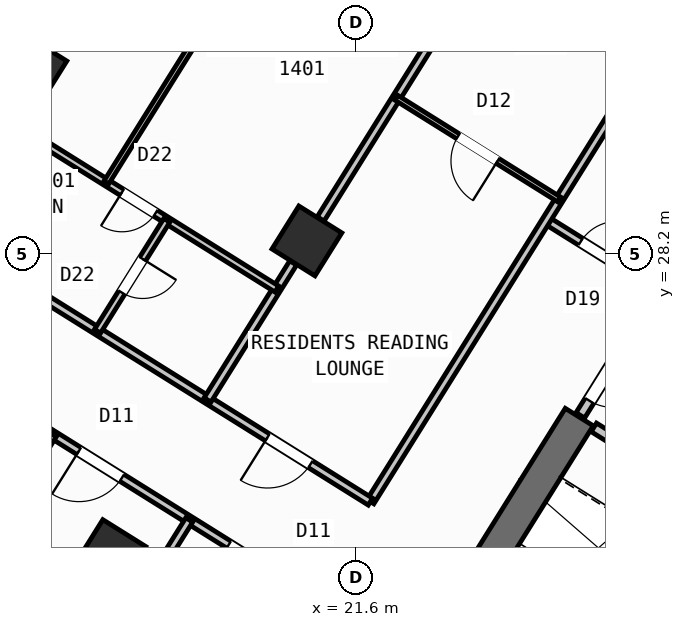
"""IFC4 building model, lengths in metres.
Left out: names, types, materials, properties, quantities, classifications, styles, units other than length and angle.
Written with IfcOpenShell. Run it as: python <this file> out.ifc"""

import sys

from ifc_helpers import new_model, si_unit, direction, frame, frame_2d, origin, origin_2d, place, context, subcontext, project, spatial, rectangle, hollow_rectangle, extrude, source, transform, mapped, element, fill, save


model = new_model("IFC4")
c1 = context("Model", 3, precision=1e-05, world=origin(), true_north=direction((0.0, 1.0)))
c2 = subcontext(c1, "Body", "Model", "MODEL_VIEW")
j1 = project(units=[si_unit("LENGTHUNIT", "METRE"), si_unit("PLANEANGLEUNIT", "RADIAN")], contexts=[c1])
p1 = place(None, origin())
s1 = spatial("IfcSite", under=j1, at=p1, CompositionType="ELEMENT")
p2 = place(p1, origin())
s2 = spatial("IfcBuilding", under=s1, at=p2, CompositionType="ELEMENT")
p3 = place(p2, frame((0.0, 0.0, 56.4)))
s3 = spatial("IfcBuildingStorey", under=s2, at=p3, CompositionType="ELEMENT", Elevation=56.4)
p4 = place(p3, frame((26.007, 24.976, 0.0), z_axis=(0.0, 0.0, 1.0), x_axis=(-0.529916319127, -0.848049936456, 0.0)))
e1 = element("IfcWall", 1, at=p4, inside=s3, PredefinedType="SHEAR", context=c2, shape_type="SweptSolid", body=[
    extrude(rectangle(XDim=6.375, YDim=0.65, at=frame_2d((3.188, 0.0))), origin(), (0.0, 0.0, 1.0), 3.35),
])
m1 = source(origin(), c2, "Body", "SweptSolid", [
    extrude(hollow_rectangle(XDim=1.0, YDim=1.0, WallThickness=0.04, at=origin_2d()), origin(), (0.0, 0.0, 1.0), 3.6),
])
for number, where, z_axis, x_axis in (
    (2, (20.632, 28.452, 0.0), (0.0, 0.0, 1.0), (-0.848, 0.53, 0.0)),
    (3, (16.764, 22.261, 0.0), (0.0, 0.0, 1.0), (-0.848, 0.53, 0.0)),
    (4, (15.205, 31.844, 0.0), (0.0, 0.0, 1.0), (-0.848, 0.53, 0.0)),
):
    element("IfcColumn", number, at=place(p3, frame(where, z_axis=z_axis, x_axis=x_axis)), inside=s3, PredefinedType="COLUMN", context=c2, shape_type="MappedRepresentation", body=[
        mapped(m1, transform((0.0, 0.0, 0.0), scale=1.0)),
    ])
p5 = place(p3, frame((29.268, 6.429, 0.0), z_axis=(0.0, 0.0, 1.0), x_axis=(-0.848049971435, 0.529916263149, 0.0)))
e5 = element("IfcWall", 5, at=p5, inside=s3, PredefinedType="STANDARD", context=c2, shape_type="SweptSolid", body=[
    extrude(rectangle(XDim=31.588, YDim=0.32, at=frame_2d((15.794, 0.0))), origin(), (0.0, 0.0, 1.0), 3.35),
])
p6 = place(p5, frame((16.235, 0.0, 0.0)))
e6 = element("IfcOpeningElement", 6, at=p6, cuts=e5, PredefinedType="OPENING", context=c2, shape_type="SweptSolid", body=[
    extrude(rectangle(XDim=1.2, YDim=2.15, at=frame_2d((0.6, 1.075))), frame((0.0, 0.17, 0.0), z_axis=(0.0, -1.0, 0.0), x_axis=(1.0, 0.0, 0.0)), (0.0, 0.0, 1.0), 0.34),
])
p7 = place(p5, frame((2.989, 0.0, 0.8)))
e7 = element("IfcOpeningElement", 7, at=p7, cuts=e5, PredefinedType="OPENING", context=c2, shape_type="SweptSolid", body=[
    extrude(rectangle(XDim=2.1, YDim=1.55, at=frame_2d((1.05, 0.775))), frame((0.0, 0.17, 0.0), z_axis=(0.0, -1.0, 0.0), x_axis=(1.0, 0.0, 0.0)), (0.0, 0.0, 1.0), 0.34),
])
p8 = place(p5, frame((8.359, 0.0, 0.8)))
e8 = element("IfcOpeningElement", 8, at=p8, cuts=e5, PredefinedType="OPENING", context=c2, shape_type="SweptSolid", body=[
    extrude(rectangle(XDim=2.1, YDim=1.55, at=frame_2d((1.05, 0.775))), frame((0.0, 0.17, 0.0), z_axis=(0.0, -1.0, 0.0), x_axis=(1.0, 0.0, 0.0)), (0.0, 0.0, 1.0), 0.34),
])
p9 = place(p5, frame((13.284, 0.0, 0.95)))
e9 = element("IfcOpeningElement", 9, at=p9, cuts=e5, PredefinedType="OPENING", context=c2, shape_type="SweptSolid", body=[
    extrude(rectangle(XDim=1.2, YDim=1.4, at=frame_2d((0.6, 0.7))), frame((0.0, 0.17, 0.0), z_axis=(0.0, -1.0, 0.0), x_axis=(1.0, 0.0, 0.0)), (0.0, 0.0, 1.0), 0.34),
])
p10 = place(p5, frame((22.374, 0.0, 0.95)))
e10 = element("IfcOpeningElement", 10, at=p10, cuts=e5, PredefinedType="OPENING", context=c2, shape_type="SweptSolid", body=[
    extrude(rectangle(XDim=1.2, YDim=1.4, at=frame_2d((0.6, 0.7))), frame((0.0, 0.17, 0.0), z_axis=(0.0, -1.0, 0.0), x_axis=(1.0, 0.0, 0.0)), (0.0, 0.0, 1.0), 0.34),
])
p11 = place(p5, frame((26.351, 0.0, 1.0)))
e11 = element("IfcOpeningElement", 11, at=p11, cuts=e5, PredefinedType="OPENING", context=c2, shape_type="SweptSolid", body=[
    extrude(rectangle(XDim=0.9, YDim=1.25, at=frame_2d((0.45, 0.625))), frame((0.0, 0.17, 0.0), z_axis=(0.0, -1.0, 0.0), x_axis=(1.0, 0.0, 0.0)), (0.0, 0.0, 1.0), 0.34),
])
p12 = place(p5, frame((29.052, 0.0, 0.85)))
e12 = element("IfcOpeningElement", 12, at=p12, cuts=e5, PredefinedType="OPENING", context=c2, shape_type="SweptSolid", body=[
    extrude(rectangle(XDim=1.8, YDim=1.5, at=frame_2d((0.9, 0.75))), frame((0.0, 0.17, 0.0), z_axis=(0.0, -1.0, 0.0), x_axis=(1.0, 0.0, 0.0)), (0.0, 0.0, 1.0), 0.34),
])
p13 = place(p3, frame((14.138, 41.825, 0.0), z_axis=(0.0, 0.0, 1.0), x_axis=(0.848046498049, -0.529921821731, 0.0)))
e13 = element("IfcWall", 13, at=p13, inside=s3, PredefinedType="STANDARD", context=c2, shape_type="SweptSolid", body=[
    extrude(rectangle(XDim=31.588, YDim=0.32, at=frame_2d((15.794, 0.0))), origin(), (0.0, 0.0, 1.0), 3.35),
])
p14 = place(p13, frame((9.772, 0.0, 0.0)))
e14 = element("IfcOpeningElement", 14, at=p14, cuts=e13, PredefinedType="OPENING", context=c2, shape_type="SweptSolid", body=[
    extrude(rectangle(XDim=1.05, YDim=2.15, at=frame_2d((0.525, 1.075))), frame((0.0, 0.17, 0.0), z_axis=(0.0, -1.0, 0.0), x_axis=(1.0, 0.0, 0.0)), (0.0, 0.0, 1.0), 0.34),
])
p15 = place(p13, frame((0.966, 0.0, 0.85)))
e15 = element("IfcOpeningElement", 15, at=p15, cuts=e13, PredefinedType="OPENING", context=c2, shape_type="SweptSolid", body=[
    extrude(rectangle(XDim=1.5, YDim=1.5, at=frame_2d((0.75, 0.75))), frame((0.0, 0.17, 0.0), z_axis=(0.0, -1.0, 0.0), x_axis=(1.0, 0.0, 0.0)), (0.0, 0.0, 1.0), 0.34),
])
p16 = place(p13, frame((4.121, 0.0, 1.0)))
e16 = element("IfcOpeningElement", 16, at=p16, cuts=e13, PredefinedType="OPENING", context=c2, shape_type="SweptSolid", body=[
    extrude(rectangle(XDim=0.9, YDim=1.25, at=frame_2d((0.45, 0.625))), frame((0.0, 0.17, 0.0), z_axis=(0.0, -1.0, 0.0), x_axis=(1.0, 0.0, 0.0)), (0.0, 0.0, 1.0), 0.34),
])
p17 = place(p13, frame((13.899, 0.0, 0.85)))
e17 = element("IfcOpeningElement", 17, at=p17, cuts=e13, PredefinedType="OPENING", context=c2, shape_type="SweptSolid", body=[
    extrude(rectangle(XDim=1.5, YDim=1.5, at=frame_2d((0.75, 0.75))), frame((0.0, 0.17, 0.0), z_axis=(0.0, -1.0, 0.0), x_axis=(1.0, 0.0, 0.0)), (0.0, 0.0, 1.0), 0.34),
])
p18 = place(p13, frame((22.019, 0.0, 0.95)))
e18 = element("IfcOpeningElement", 18, at=p18, cuts=e13, PredefinedType="OPENING", context=c2, shape_type="SweptSolid", body=[
    extrude(rectangle(XDim=1.2, YDim=1.4, at=frame_2d((0.6, 0.7))), frame((0.0, 0.17, 0.0), z_axis=(0.0, -1.0, 0.0), x_axis=(1.0, 0.0, 0.0)), (0.0, 0.0, 1.0), 0.34),
])
p19 = place(p13, frame((27.569, 0.0, 0.95)))
e19 = element("IfcOpeningElement", 19, at=p19, cuts=e13, PredefinedType="OPENING", context=c2, shape_type="SweptSolid", body=[
    extrude(rectangle(XDim=1.2, YDim=1.4, at=frame_2d((0.6, 0.7))), frame((0.0, 0.17, 0.0), z_axis=(0.0, -1.0, 0.0), x_axis=(1.0, 0.0, 0.0)), (0.0, 0.0, 1.0), 0.34),
])
p20 = place(p3, frame((31.525, 21.504, 0.0), z_axis=(0.0, 0.0, 1.0), x_axis=(-0.848044998614, 0.529924221305, 0.0)))
e20 = element("IfcWall", 20, at=p20, inside=s3, PredefinedType="STANDARD", context=c2, shape_type="SweptSolid", body=[
    extrude(rectangle(XDim=6.168, YDim=0.2, at=frame_2d((3.084, 0.0))), origin(), (0.0, 0.0, 1.0), 3.34),
])
p21 = place(p20, frame((4.4, 0.0, 0.0)))
e21 = element("IfcOpeningElement", 21, at=p21, cuts=e20, PredefinedType="OPENING", context=c2, shape_type="SweptSolid", body=[
    extrude(rectangle(XDim=0.86, YDim=2.05, at=frame_2d((0.43, 1.025))), frame((0.0, 0.11, 0.0), z_axis=(0.0, -1.0, 0.0), x_axis=(1.0, 0.0, 0.0)), (0.0, 0.0, 1.0), 0.22),
])
p22 = place(p20, frame((1.45, 0.0, 0.0)))
e22 = element("IfcOpeningElement", 22, at=p22, cuts=e20, PredefinedType="OPENING", context=c2, shape_type="SweptSolid", body=[
    extrude(rectangle(XDim=0.86, YDim=2.05, at=frame_2d((0.43, 1.025))), frame((0.0, 0.11, 0.0), z_axis=(0.0, -1.0, 0.0), x_axis=(1.0, 0.0, 0.0)), (0.0, 0.0, 1.0), 0.22),
])
p23 = place(p3, frame((27.596, 27.52, 0.0), z_axis=(0.0, 0.0, 1.0), x_axis=(-0.529865479138, -0.848081702443, 0.0)))
e23 = element("IfcWall", 23, at=p23, inside=s3, PredefinedType="STANDARD", context=c2, shape_type="SweptSolid", body=[
    extrude(rectangle(XDim=2.96, YDim=0.2, at=frame_2d((1.48, 0.0))), origin(), (0.0, 0.0, 1.0), 3.34),
])
p24 = place(p23, frame((1.76, 0.0, 0.0)))
e24 = element("IfcOpeningElement", 24, at=p24, cuts=e23, PredefinedType="OPENING", context=c2, shape_type="SweptSolid", body=[
    extrude(rectangle(XDim=0.86, YDim=2.05, at=frame_2d((0.43, 1.025))), frame((0.0, 0.11, 0.0), z_axis=(0.0, -1.0, 0.0), x_axis=(1.0, 0.0, 0.0)), (0.0, 0.0, 1.0), 0.22),
])
p25 = place(p3, frame((27.57, 27.478, 0.0), z_axis=(0.0, 0.0, 1.0), x_axis=(-0.848050851465, 0.529914854792, 0.0)))
e25 = element("IfcWall", 25, at=p25, inside=s3, PredefinedType="PARTITIONING", context=c2, shape_type="SweptSolid", body=[
    extrude(rectangle(XDim=2.61, YDim=0.16, at=frame_2d((1.305, 0.0))), origin(), (0.0, 0.0, 1.0), 3.34),
])
p26 = place(p25, frame((0.95, 0.0, 0.0)))
e26 = element("IfcOpeningElement", 26, at=p26, cuts=e25, PredefinedType="OPENING", context=c2, shape_type="SweptSolid", body=[
    extrude(rectangle(XDim=0.86, YDim=2.05, at=frame_2d((0.43, 1.025))), frame((0.0, 0.09, 0.0), z_axis=(0.0, -1.0, 0.0), x_axis=(1.0, 0.0, 0.0)), (0.0, 0.0, 1.0), 0.18),
])
p27 = place(p3, frame((27.953, 33.016, 0.0), z_axis=(0.0, 0.0, 1.0), x_axis=(-0.529905022231, -0.848056995381, 0.0)))
e27 = element("IfcWall", 27, at=p27, inside=s3, PredefinedType="PARTITIONING", context=c2, shape_type="SweptSolid", body=[
    extrude(rectangle(XDim=11.45, YDim=0.16, at=frame_2d((5.725, 0.0))), origin(), (0.0, 0.0, 1.0), 3.34),
])
p28 = place(p3, frame((21.885, 23.306, 0.0), z_axis=(0.0, 0.0, 1.0), x_axis=(-0.848052408131, 0.529912363569, 0.0)))
e28 = element("IfcWall", 28, at=p28, inside=s3, PredefinedType="PARTITIONING", context=c2, shape_type="SweptSolid", body=[
    extrude(rectangle(XDim=16.73, YDim=0.16, at=frame_2d((8.365, 0.0))), origin(), (0.0, 0.0, 1.0), 3.34),
])
p29 = place(p28, frame((1.395, 0.0, 0.0)))
e29 = element("IfcOpeningElement", 29, at=p29, cuts=e28, PredefinedType="OPENING", context=c2, shape_type="SweptSolid", body=[
    extrude(rectangle(XDim=1.0, YDim=2.1, at=frame_2d((0.5, 1.05))), frame((0.0, 0.09, 0.0), z_axis=(0.0, -1.0, 0.0), x_axis=(1.0, 0.0, 0.0)), (0.0, 0.0, 1.0), 0.18),
])
p30 = place(p28, frame((7.82, 0.0, 0.0)))
e30 = element("IfcOpeningElement", 30, at=p30, cuts=e28, PredefinedType="OPENING", context=c2, shape_type="SweptSolid", body=[
    extrude(rectangle(XDim=1.0, YDim=2.1, at=frame_2d((0.5, 1.05))), frame((0.0, 0.09, 0.0), z_axis=(0.0, -1.0, 0.0), x_axis=(1.0, 0.0, 0.0)), (0.0, 0.0, 1.0), 0.18),
])
p31 = place(p28, frame((11.14, 0.0, 0.0)))
e31 = element("IfcOpeningElement", 31, at=p31, cuts=e28, PredefinedType="OPENING", context=c2, shape_type="SweptSolid", body=[
    extrude(rectangle(XDim=1.0, YDim=2.1, at=frame_2d((0.5, 1.05))), frame((0.0, 0.09, 0.0), z_axis=(0.0, -1.0, 0.0), x_axis=(1.0, 0.0, 0.0)), (0.0, 0.0, 1.0), 0.18),
])
p32 = place(p3, frame((20.719, 21.44, 0.0), z_axis=(0.0, 0.0, 1.0), x_axis=(-0.848048310262, 0.529918921593, 0.0)))
e32 = element("IfcWall", 32, at=p32, inside=s3, PredefinedType="PARTITIONING", context=c2, shape_type="SweptSolid", body=[
    extrude(rectangle(XDim=16.73, YDim=0.16, at=frame_2d((8.365, 0.0))), origin(), (0.0, 0.0, 1.0), 3.34),
])
p33 = place(p32, frame((0.92, 0.0, 0.0)))
e33 = element("IfcOpeningElement", 33, at=p33, cuts=e32, PredefinedType="OPENING", context=c2, shape_type="SweptSolid", body=[
    extrude(rectangle(XDim=1.0, YDim=2.1, at=frame_2d((0.5, 1.05))), frame((0.0, 0.09, 0.0), z_axis=(0.0, -1.0, 0.0), x_axis=(1.0, 0.0, 0.0)), (0.0, 0.0, 1.0), 0.18),
])
p34 = place(p32, frame((4.408, 0.0, 0.0)))
e34 = element("IfcOpeningElement", 34, at=p34, cuts=e32, PredefinedType="OPENING", context=c2, shape_type="SweptSolid", body=[
    extrude(rectangle(XDim=1.0, YDim=2.1, at=frame_2d((0.5, 1.05))), frame((0.0, 0.09, 0.0), z_axis=(0.0, -1.0, 0.0), x_axis=(1.0, 0.0, 0.0)), (0.0, 0.0, 1.0), 0.18),
])
p35 = place(p32, frame((7.271, 0.0, 0.0)))
e35 = element("IfcOpeningElement", 35, at=p35, cuts=e32, PredefinedType="OPENING", context=c2, shape_type="SweptSolid", body=[
    extrude(rectangle(XDim=1.0, YDim=2.1, at=frame_2d((0.5, 1.05))), frame((0.0, 0.09, 0.0), z_axis=(0.0, -1.0, 0.0), x_axis=(1.0, 0.0, 0.0)), (0.0, 0.0, 1.0), 0.18),
])
p36 = place(p32, frame((10.78, 0.0, 0.0)))
e36 = element("IfcOpeningElement", 36, at=p36, cuts=e32, PredefinedType="OPENING", context=c2, shape_type="SweptSolid", body=[
    extrude(rectangle(XDim=1.0, YDim=2.1, at=frame_2d((0.5, 1.05))), frame((0.0, 0.09, 0.0), z_axis=(0.0, -1.0, 0.0), x_axis=(1.0, 0.0, 0.0)), (0.0, 0.0, 1.0), 0.18),
])
p37 = place(p32, frame((14.372, 0.0, 0.0)))
e37 = element("IfcOpeningElement", 37, at=p37, cuts=e32, PredefinedType="OPENING", context=c2, shape_type="SweptSolid", body=[
    extrude(rectangle(XDim=1.0, YDim=2.1, at=frame_2d((0.5, 1.05))), frame((0.0, 0.09, 0.0), z_axis=(0.0, -1.0, 0.0), x_axis=(1.0, 0.0, 0.0)), (0.0, 0.0, 1.0), 0.18),
])
p38 = place(p3, frame((18.31, 22.946, 0.0), z_axis=(0.0, 0.0, 1.0), x_axis=(-0.529914428959, -0.848051117552, 0.0)))
e38 = element("IfcWall", 38, at=p38, inside=s3, PredefinedType="PARTITIONING", context=c2, shape_type="SweptSolid", body=[
    extrude(rectangle(XDim=8.05, YDim=0.16, at=frame_2d((4.025, 0.0))), origin(), (0.0, 0.0, 1.0), 3.34),
])
p39 = place(p3, frame((15.618, 24.628, 0.0), z_axis=(0.0, 0.0, 1.0), x_axis=(-0.529928058306, -0.848042600947, 0.0)))
e39 = element("IfcWall", 39, at=p39, inside=s3, PredefinedType="PARTITIONING", context=c2, shape_type="SweptSolid", body=[
    extrude(rectangle(XDim=8.05, YDim=0.16, at=frame_2d((4.025, 0.0))), origin(), (0.0, 0.0, 1.0), 2.995),
])
p40 = place(p3, frame((24.229, 34.209, 0.0), z_axis=(0.0, 0.0, 1.0), x_axis=(-0.529897533635, -0.848061674554, 0.0)))
e40 = element("IfcWall", 40, at=p40, inside=s3, PredefinedType="PARTITIONING", context=c2, shape_type="SweptSolid", body=[
    extrude(rectangle(XDim=6.276, YDim=0.16, at=frame_2d((3.138, 0.0))), origin(), (0.0, 0.0, 1.0), 2.725),
])
p41 = place(p3, frame((20.361, 28.018, 0.0), z_axis=(0.0, 0.0, 1.0), x_axis=(-0.529875025416, -0.848075738033, 0.0)))
e41 = element("IfcWall", 41, at=p41, inside=s3, PredefinedType="PARTITIONING", context=c2, shape_type="SweptSolid", body=[
    extrude(rectangle(XDim=3.188, YDim=0.16, at=frame_2d((1.594, 0.0))), origin(), (0.0, 0.0, 1.0), 2.725),
])
p42 = place(p3, frame((25.612, 29.269, 0.0), z_axis=(0.0, 0.0, 1.0), x_axis=(-0.84803087207, 0.529946827537, 0.0)))
e42 = element("IfcWall", 42, at=p42, inside=s3, PredefinedType="PARTITIONING", context=c2, shape_type="SweptSolid", body=[
    extrude(rectangle(XDim=3.79, YDim=0.11, at=frame_2d((1.895, 0.0))), origin(), (0.0, 0.0, 1.0), 3.34),
])
p43 = place(p42, frame((1.435, 0.0, 0.0)))
e43 = element("IfcOpeningElement", 43, at=p43, cuts=e42, PredefinedType="OPENING", context=c2, shape_type="SweptSolid", body=[
    extrude(rectangle(XDim=0.92, YDim=2.08, at=frame_2d((0.46, 1.04))), frame((0.0, 0.065, 0.0), z_axis=(0.0, -1.0, 0.0), x_axis=(1.0, 0.0, 0.0)), (0.0, 0.0, 1.0), 0.13),
])
p44 = place(p3, frame((20.039, 27.502, 0.0), z_axis=(0.0, 0.0, 1.0), x_axis=(-0.848039019877, 0.529933789039, 0.0)))
e44 = element("IfcWall", 44, at=p44, inside=s3, PredefinedType="PLUMBINGWALL", context=c2, shape_type="SweptSolid", body=[
    extrude(rectangle(XDim=6.4, YDim=0.14, at=frame_2d((3.2, 0.0))), origin(), (0.0, 0.0, 1.0), 3.34),
])
p45 = place(p44, frame((2.824, 0.0, 0.0)))
e45 = element("IfcOpeningElement", 45, at=p45, cuts=e44, PredefinedType="OPENING", context=c2, shape_type="SweptSolid", body=[
    extrude(rectangle(XDim=0.78, YDim=2.05, at=frame_2d((0.39, 1.025))), frame((0.0, 0.08, 0.0), z_axis=(0.0, -1.0, 0.0), x_axis=(1.0, 0.0, 0.0)), (0.0, 0.0, 1.0), 0.16),
])
p46 = place(p3, frame((17.867, 28.859, 0.0), z_axis=(0.0, 0.0, 1.0), x_axis=(-0.529913878929, -0.848051461244, 0.0)))
e46 = element("IfcWall", 46, at=p46, inside=s3, PredefinedType="PLUMBINGWALL", context=c2, shape_type="SweptSolid", body=[
    extrude(rectangle(XDim=2.58, YDim=0.14, at=frame_2d((1.29, 0.0))), origin(), (0.0, 0.0, 1.0), 3.34),
])
p47 = place(p46, frame((0.9, 0.0, 0.0)))
e47 = element("IfcOpeningElement", 47, at=p47, cuts=e46, PredefinedType="OPENING", context=c2, shape_type="SweptSolid", body=[
    extrude(rectangle(XDim=0.78, YDim=2.05, at=frame_2d((0.39, 1.025))), frame((0.0, 0.08, 0.0), z_axis=(0.0, -1.0, 0.0), x_axis=(1.0, 0.0, 0.0)), (0.0, 0.0, 1.0), 0.16),
])
p48 = place(p3, frame((21.517, 37.356, 0.0), z_axis=(0.0, 0.0, 1.0), x_axis=(-0.529919705034, -0.848047820713, 0.0)))
e48 = element("IfcWall", 48, at=p48, inside=s3, PredefinedType="PARTITIONING", context=c2, shape_type="SweptSolid", body=[
    extrude(rectangle(XDim=9.14, YDim=0.11, at=frame_2d((4.57, 0.0))), origin(), (0.0, 0.0, 1.0), 3.34),
])
p49 = place(p48, frame((0.47, 0.0, 0.0)))
e49 = element("IfcOpeningElement", 49, at=p49, cuts=e48, PredefinedType="OPENING", context=c2, shape_type="SweptSolid", body=[
    extrude(rectangle(XDim=0.92, YDim=2.08, at=frame_2d((0.46, 1.04))), frame((0.0, 0.065, 0.0), z_axis=(0.0, -1.0, 0.0), x_axis=(1.0, 0.0, 0.0)), (0.0, 0.0, 1.0), 0.13),
])
p50 = place(p3, frame((16.995, 40.182, 0.0), z_axis=(0.0, 0.0, 1.0), x_axis=(-0.529927783988, -0.848042772363, 0.0)))
e50 = element("IfcWall", 50, at=p50, inside=s3, PredefinedType="PARTITIONING", context=c2, shape_type="SweptSolid", body=[
    extrude(rectangle(XDim=11.72, YDim=0.11, at=frame_2d((5.86, 0.0))), origin(), (0.0, 0.0, 1.0), 3.34),
])
p51 = place(p50, frame((10.08, 0.0, 0.0)))
e51 = element("IfcOpeningElement", 51, at=p51, cuts=e50, PredefinedType="OPENING", context=c2, shape_type="SweptSolid", body=[
    extrude(rectangle(XDim=0.78, YDim=2.05, at=frame_2d((0.39, 1.025))), frame((0.0, 0.065, 0.0), z_axis=(0.0, -1.0, 0.0), x_axis=(1.0, 0.0, 0.0)), (0.0, 0.0, 1.0), 0.13),
])
p52 = place(p50, frame((4.2, 0.0, 0.0)))
e52 = element("IfcOpeningElement", 52, at=p52, cuts=e50, PredefinedType="OPENING", context=c2, shape_type="SweptSolid", body=[
    extrude(rectangle(XDim=0.92, YDim=2.08, at=frame_2d((0.46, 1.04))), frame((0.0, 0.065, 0.0), z_axis=(0.0, -1.0, 0.0), x_axis=(1.0, 0.0, 0.0)), (0.0, 0.0, 1.0), 0.13),
])
m2 = source(origin(), c2, "Body", "SweptSolid", [
    extrude(rectangle(XDim=0.86, YDim=2.05, at=frame_2d((0.43, 1.025))), frame((0.0, 0.025, 0.0), z_axis=(0.0, -1.0, 0.0), x_axis=(1.0, 0.0, 0.0)), (0.0, 0.0, 1.0), 0.05),
])
p53 = place(p26, frame((0.86, 0.0, 0.0), z_axis=(0.0, 0.0, 1.0), x_axis=(-1.0, 0.0, 0.0)))
e53 = element("IfcDoor", 53, at=p53, inside=s3, OperationType="SINGLE_SWING_RIGHT", PredefinedType="DOOR", context=c2, shape_type="MappedRepresentation", body=[
    mapped(m2, transform((0.0, 0.0, 0.0), scale=1.0)),
])
fill(e26, e53)
p54 = place(p24, origin())
e54 = element("IfcDoor", 54, at=p54, inside=s3, OperationType="SINGLE_SWING_LEFT", PredefinedType="DOOR", context=c2, shape_type="MappedRepresentation", body=[
    mapped(m2, transform((0.0, 0.0, 0.0), scale=1.0)),
])
fill(e24, e54)
m3 = source(origin(), c2, "Body", "SweptSolid", [
    extrude(rectangle(XDim=1.0, YDim=2.1, at=frame_2d((0.5, 1.05))), frame((0.0, 0.025, 0.0), z_axis=(0.0, -1.0, 0.0), x_axis=(1.0, 0.0, 0.0)), (0.0, 0.0, 1.0), 0.05),
])
p55 = place(p33, origin())
e55 = element("IfcDoor", 55, at=p55, inside=s3, OperationType="SINGLE_SWING_LEFT", PredefinedType="DOOR", context=c2, shape_type="MappedRepresentation", body=[
    mapped(m3, transform((0.0, 0.0, 0.0), scale=1.0)),
])
fill(e33, e55)
p56 = place(p34, origin())
e56 = element("IfcDoor", 56, at=p56, inside=s3, OperationType="SINGLE_SWING_RIGHT", PredefinedType="DOOR", context=c2, shape_type="MappedRepresentation", body=[
    mapped(m3, transform((0.0, 0.0, 0.0), scale=1.0)),
])
fill(e34, e56)
p57 = place(p29, origin())
e57 = element("IfcDoor", 57, at=p57, inside=s3, OperationType="SINGLE_SWING_RIGHT", PredefinedType="DOOR", context=c2, shape_type="MappedRepresentation", body=[
    mapped(m3, transform((0.0, 0.0, 0.0), scale=1.0)),
])
fill(e29, e57)
m4 = source(origin(), c2, "Body", "SweptSolid", [
    extrude(rectangle(XDim=0.92, YDim=2.08, at=frame_2d((0.46, 1.04))), frame((0.0, 0.025, 0.0), z_axis=(0.0, -1.0, 0.0), x_axis=(1.0, 0.0, 0.0)), (0.0, 0.0, 1.0), 0.05),
])
p58 = place(p43, origin())
e58 = element("IfcDoor", 58, at=p58, inside=s3, OperationType="SINGLE_SWING_LEFT", PredefinedType="DOOR", context=c2, shape_type="MappedRepresentation", body=[
    mapped(m4, transform((0.0, 0.0, 0.0), scale=1.0)),
])
fill(e43, e58)
m5 = source(origin(), c2, "Body", "SweptSolid", [
    extrude(rectangle(XDim=0.78, YDim=2.05, at=frame_2d((0.39, 1.025))), frame((0.0, 0.025, 0.0), z_axis=(0.0, -1.0, 0.0), x_axis=(1.0, 0.0, 0.0)), (0.0, 0.0, 1.0), 0.05),
])
p59 = place(p45, origin())
e59 = element("IfcDoor", 59, at=p59, inside=s3, OperationType="SINGLE_SWING_RIGHT", PredefinedType="DOOR", context=c2, shape_type="MappedRepresentation", body=[
    mapped(m5, transform((0.0, 0.0, 0.0), scale=1.0)),
])
fill(e45, e59)
p60 = place(p47, origin())
e60 = element("IfcDoor", 60, at=p60, inside=s3, OperationType="SINGLE_SWING_LEFT", PredefinedType="DOOR", context=c2, shape_type="MappedRepresentation", body=[
    mapped(m5, transform((0.0, 0.0, 0.0), scale=1.0)),
])
fill(e47, e60)
save(model, sys.argv[1])
